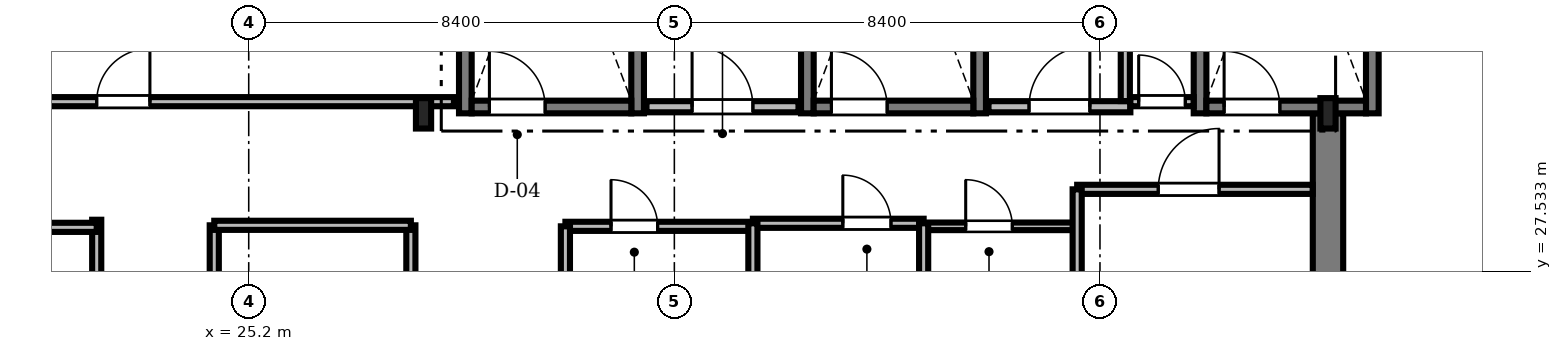
"""IFC4 building model, lengths in metres.
Left out: names, types, materials, properties, quantities, classifications, styles, units other than length and angle.
Written with IfcOpenShell. Run it as: python <this file> out.ifc"""

import sys

from ifc_helpers import new_model, si_unit, direction, frame, frame_2d, origin, origin_2d, place, context, subcontext, project, spatial, rectangle, i_section, extrude, source, transform, mapped, element, fill, save


model = new_model("IFC4")
c1 = context("Model", 3, precision=1e-05, world=origin(), true_north=direction((0.0, 1.0)))
c2 = subcontext(c1, "Body", "Model", "MODEL_VIEW")
j1 = project(units=[si_unit("LENGTHUNIT", "METRE"), si_unit("PLANEANGLEUNIT", "RADIAN")], contexts=[c1])
p1 = place(None, origin())
s1 = spatial("IfcSite", under=j1, at=p1, CompositionType="ELEMENT")
p2 = place(p1, origin())
s2 = spatial("IfcBuilding", under=s1, at=p2, CompositionType="ELEMENT")
p3 = place(p2, frame((0.0, 0.0, 254.55)))
s3 = spatial("IfcBuildingStorey", under=s2, at=p3, CompositionType="ELEMENT", Elevation=254.55)
m1 = source(origin(), c2, "Body", "SweptSolid", [
    extrude(rectangle(XDim=13.15, YDim=0.6, at=frame_2d((6.575, 0.0))), origin(), (0.0, 0.0, 1.0), 3.65),
])
p4 = place(p3, frame((46.5, 17.5, 0.0), z_axis=(0.0, 0.0, 1.0), x_axis=(0.0, 1.0, 0.0)))
e1 = element("IfcWall", 1, at=p4, inside=s3, PredefinedType="SHEAR", context=c2, shape_type="MappedRepresentation", body=[
    mapped(m1, transform((0.0, 0.0, 0.0), scale=1.0)),
])
m2 = source(origin(), c2, "Body", "SweptSolid", [
    extrude(i_section(OverallWidth=0.3, OverallDepth=0.6, WebThickness=0.015, FlangeThickness=0.03, FilletRadius=0.027, at=origin_2d()), origin(), (0.0, 0.0, 1.0), 3.65),
])
for number, where, z_axis, x_axis in (
    (2, (28.65, 30.65, 0.0), (0.0, 0.0, 1.0), (1.0, 0.0, 0.0)),
    (3, (46.5, 30.65, 0.0), (0.0, 0.0, 1.0), (1.0, 0.0, 0.0)),
):
    element("IfcColumn", number, at=place(p3, frame(where, z_axis=z_axis, x_axis=x_axis)), inside=s3, PredefinedType="COLUMN", context=c2, shape_type="MappedRepresentation", body=[
        mapped(m2, transform((0.0, 0.0, 0.0), scale=1.0)),
    ])
m3 = source(origin(), c2, "Body", "SweptSolid", [
    extrude(rectangle(XDim=9.35, YDim=0.25, at=frame_2d((4.675, 0.0))), origin(), (0.0, 0.0, 1.0), 3.75),
])
for number, where, z_axis, x_axis in (
    (4, (29.475, 30.65, 0.0), (0.0, 0.0, 1.0), (0.0, 1.0, 0.0)),
    (5, (32.875, 30.65, 0.0), (0.0, 0.0, 1.0), (0.0, 1.0, 0.0)),
):
    element("IfcWall", number, at=place(p3, frame(where, z_axis=z_axis, x_axis=x_axis)), inside=s3, PredefinedType="SOLIDWALL", context=c2, shape_type="MappedRepresentation", body=[
        mapped(m3, transform((0.0, 0.0, 0.0), scale=1.0)),
    ])
m4 = source(origin(), c2, "Body", "SweptSolid", [
    extrude(rectangle(XDim=3.15, YDim=0.25, at=frame_2d((1.575, 0.0))), origin(), (0.0, 0.0, 1.0), 3.75),
])
p5 = place(p3, frame((29.6, 30.775, 0.0), z_axis=(0.0, 0.0, 1.0), x_axis=(1.0, 0.0, 0.0)))
e6 = element("IfcWall", 6, at=p5, inside=s3, PredefinedType="SOLIDWALL", context=c2, shape_type="MappedRepresentation", body=[
    mapped(m4, transform((0.0, 0.0, 0.0), scale=1.0)),
])
m5 = source(origin(), c2, "Body", "SweptSolid", [
    extrude(rectangle(XDim=1.1, YDim=2.2, at=frame_2d((0.55, 1.1))), frame((0.0, 0.135, 0.0), z_axis=(0.0, -1.0, 0.0), x_axis=(1.0, 0.0, 0.0)), (0.0, 0.0, 1.0), 0.27),
])
p6 = place(p5, frame((0.35, 0.0, 0.0)))
e7 = element("IfcOpeningElement", 7, at=p6, cuts=e6, PredefinedType="OPENING", context=c2, shape_type="MappedRepresentation", body=[
    mapped(m5, transform((0.0, 0.0, 0.0), scale=1.0)),
])
for number, where, z_axis, x_axis in (
    (8, (36.225, 30.65, 0.0), (0.0, 0.0, 1.0), (0.0, 1.0, 0.0)),
    (9, (39.625, 30.65, 0.0), (0.0, 0.0, 1.0), (0.0, 1.0, 0.0)),
):
    element("IfcWall", number, at=place(p3, frame(where, z_axis=z_axis, x_axis=x_axis)), inside=s3, PredefinedType="SOLIDWALL", context=c2, shape_type="MappedRepresentation", body=[
        mapped(m3, transform((0.0, 0.0, 0.0), scale=1.0)),
    ])
p7 = place(p3, frame((36.35, 30.775, 0.0), z_axis=(0.0, 0.0, 1.0), x_axis=(1.0, 0.0, 0.0)))
e10 = element("IfcWall", 10, at=p7, inside=s3, PredefinedType="SOLIDWALL", context=c2, shape_type="MappedRepresentation", body=[
    mapped(m4, transform((0.0, 0.0, 0.0), scale=1.0)),
])
p8 = place(p7, frame((0.35, 0.0, 0.0)))
e11 = element("IfcOpeningElement", 11, at=p8, cuts=e10, PredefinedType="OPENING", context=c2, shape_type="MappedRepresentation", body=[
    mapped(m5, transform((0.0, 0.0, 0.0), scale=1.0)),
])
for number, where, z_axis, x_axis in (
    (12, (43.975, 30.65, 0.0), (0.0, 0.0, 1.0), (0.0, 1.0, 0.0)),
    (13, (47.375, 30.65, 0.0), (0.0, 0.0, 1.0), (0.0, 1.0, 0.0)),
):
    element("IfcWall", number, at=place(p3, frame(where, z_axis=z_axis, x_axis=x_axis)), inside=s3, PredefinedType="SOLIDWALL", context=c2, shape_type="MappedRepresentation", body=[
        mapped(m3, transform((0.0, 0.0, 0.0), scale=1.0)),
    ])
p9 = place(p3, frame((44.1, 30.775, 0.0), z_axis=(0.0, 0.0, 1.0), x_axis=(1.0, 0.0, 0.0)))
e14 = element("IfcWall", 14, at=p9, inside=s3, PredefinedType="SOLIDWALL", context=c2, shape_type="MappedRepresentation", body=[
    mapped(m4, transform((0.0, 0.0, 0.0), scale=1.0)),
])
p10 = place(p9, frame((0.35, 0.0, 0.0)))
e15 = element("IfcOpeningElement", 15, at=p10, cuts=e14, PredefinedType="OPENING", context=c2, shape_type="MappedRepresentation", body=[
    mapped(m5, transform((0.0, 0.0, 0.0), scale=1.0)),
])
m6 = source(origin(), c2, "Body", "SweptSolid", [
    extrude(rectangle(XDim=3.0, YDim=0.22, at=frame_2d((1.5, 0.0))), origin(), (0.0, 0.0, 1.0), 3.65),
])
p11 = place(p3, frame((33.05, 30.78, 0.0), z_axis=(0.0, 0.0, 1.0), x_axis=(1.0, 0.0, 0.0)))
e16 = element("IfcWall", 16, at=p11, inside=s3, PredefinedType="SOLIDWALL", context=c2, shape_type="MappedRepresentation", body=[
    mapped(m6, transform((0.0, 0.0, 0.0), scale=1.0)),
])
m7 = source(origin(), c2, "Body", "SweptSolid", [
    extrude(rectangle(XDim=1.2, YDim=2.2, at=frame_2d((0.6, 1.1))), frame((0.0, 0.12, 0.0), z_axis=(0.0, -1.0, 0.0), x_axis=(1.0, 0.0, 0.0)), (0.0, 0.0, 1.0), 0.24),
])
p12 = place(p11, frame((0.9, 0.0, 0.0)))
e17 = element("IfcOpeningElement", 17, at=p12, cuts=e16, PredefinedType="OPENING", context=c2, shape_type="MappedRepresentation", body=[
    mapped(m7, transform((0.0, 0.0, 0.0), scale=1.0)),
])
m8 = source(origin(), c2, "Body", "SweptSolid", [
    extrude(rectangle(XDim=2.8, YDim=0.22, at=frame_2d((1.4, 0.0))), origin(), (0.0, 0.0, 1.0), 3.65),
])
p13 = place(p3, frame((39.8, 30.78, 0.0), z_axis=(0.0, 0.0, 1.0), x_axis=(1.0, 0.0, 0.0)))
e18 = element("IfcWall", 18, at=p13, inside=s3, PredefinedType="SOLIDWALL", context=c2, shape_type="MappedRepresentation", body=[
    mapped(m8, transform((0.0, 0.0, 0.0), scale=1.0)),
])
p14 = place(p13, frame((0.8, 0.0, 0.0)))
e19 = element("IfcOpeningElement", 19, at=p14, cuts=e18, PredefinedType="OPENING", context=c2, shape_type="MappedRepresentation", body=[
    mapped(m7, transform((0.0, 0.0, 0.0), scale=1.0)),
])
m9 = source(origin(), c2, "Body", "SweptSolid", [
    extrude(rectangle(XDim=13.328, YDim=0.18, at=frame_2d((6.664, 0.0))), origin(), (0.0, 0.0, 1.0), 2.892),
])
p15 = place(p3, frame((15.922, 30.88, 0.0), z_axis=(0.0, 0.0, 1.0), x_axis=(1.0, 0.0, 0.0)))
e20 = element("IfcWall", 20, at=p15, inside=s3, PredefinedType="PARTITIONING", context=c2, shape_type="MappedRepresentation", body=[
    mapped(m9, transform((0.0, 0.0, 0.0), scale=1.0)),
])
m10 = source(origin(), c2, "Body", "SweptSolid", [
    extrude(rectangle(XDim=1.05, YDim=2.2, at=frame_2d((0.525, 1.1))), frame((0.0, 0.1, 0.0), z_axis=(0.0, -1.0, 0.0), x_axis=(1.0, 0.0, 0.0)), (0.0, 0.0, 1.0), 0.2),
])
p16 = place(p15, frame((6.278, 0.0, 0.0)))
e21 = element("IfcOpeningElement", 21, at=p16, cuts=e20, PredefinedType="OPENING", context=c2, shape_type="MappedRepresentation", body=[
    mapped(m10, transform((0.0, 0.0, 0.0), scale=1.0)),
])
m11 = source(origin(), c2, "Body", "SweptSolid", [
    extrude(rectangle(XDim=4.648, YDim=0.18, at=frame_2d((2.324, 0.0))), origin(), (0.0, 0.0, 1.0), 3.282),
])
p17 = place(p3, frame((41.55, 29.15, 0.0), z_axis=(0.0, 0.0, 1.0), x_axis=(1.0, 0.0, 0.0)))
e22 = element("IfcWall", 22, at=p17, inside=s3, PredefinedType="PARTITIONING", context=c2, shape_type="MappedRepresentation", body=[
    mapped(m11, transform((0.0, 0.0, 0.0), scale=1.0)),
])
m12 = source(origin(), c2, "Body", "SweptSolid", [
    extrude(rectangle(XDim=1.2, YDim=2.2, at=frame_2d((0.6, 1.1))), frame((0.0, 0.1, 0.0), z_axis=(0.0, -1.0, 0.0), x_axis=(1.0, 0.0, 0.0)), (0.0, 0.0, 1.0), 0.2),
])
p18 = place(p17, frame((1.6, 0.0, 0.0)))
e23 = element("IfcOpeningElement", 23, at=p18, cuts=e22, PredefinedType="OPENING", context=c2, shape_type="MappedRepresentation", body=[
    mapped(m12, transform((0.0, 0.0, 0.0), scale=1.0)),
])
m13 = source(origin(), c2, "Body", "SweptSolid", [
    extrude(rectangle(XDim=4.24, YDim=0.18, at=frame_2d((2.12, 0.0))), origin(), (0.0, 0.0, 1.0), 3.092),
])
p19 = place(p3, frame((24.52, 24.2, 0.0), z_axis=(0.0, 0.0, 1.0), x_axis=(0.0, 1.0, 0.0)))
e24 = element("IfcWall", 24, at=p19, inside=s3, PredefinedType="PARTITIONING", context=c2, shape_type="MappedRepresentation", body=[
    mapped(m13, transform((0.0, 0.0, 0.0), scale=1.0)),
])
p20 = place(p19, frame((1.4, 0.0, 0.0)))
e25 = element("IfcOpeningElement", 25, at=p20, cuts=e24, PredefinedType="OPENING", context=c2, shape_type="MappedRepresentation", body=[
    mapped(m10, transform((0.0, 0.0, 0.0), scale=1.0)),
])
m14 = source(origin(), c2, "Body", "SweptSolid", [
    extrude(rectangle(XDim=3.7, YDim=0.18, at=frame_2d((1.85, 0.0))), origin(), (0.0, 0.0, 1.0), 3.282),
])
p21 = place(p3, frame((31.45, 28.42, 0.0), z_axis=(0.0, 0.0, 1.0), x_axis=(1.0, 0.0, 0.0)))
e26 = element("IfcWall", 26, at=p21, inside=s3, PredefinedType="PARTITIONING", context=c2, shape_type="MappedRepresentation", body=[
    mapped(m14, transform((0.0, 0.0, 0.0), scale=1.0)),
])
m15 = source(origin(), c2, "Body", "SweptSolid", [
    extrude(rectangle(XDim=0.92, YDim=2.1, at=frame_2d((0.46, 1.05))), frame((0.0, 0.1, 0.0), z_axis=(0.0, -1.0, 0.0), x_axis=(1.0, 0.0, 0.0)), (0.0, 0.0, 1.0), 0.2),
])
p22 = place(p21, frame((0.9, 0.0, 0.0)))
e27 = element("IfcOpeningElement", 27, at=p22, cuts=e26, PredefinedType="OPENING", context=c2, shape_type="MappedRepresentation", body=[
    mapped(m15, transform((0.0, 0.0, 0.0), scale=1.0)),
])
m16 = source(origin(), c2, "Body", "SweptSolid", [
    extrude(rectangle(XDim=3.37, YDim=0.18, at=frame_2d((1.685, 0.0))), origin(), (0.0, 0.0, 1.0), 3.65),
])
p23 = place(p3, frame((35.15, 28.48, 0.0), z_axis=(0.0, 0.0, 1.0), x_axis=(1.0, 0.0, 0.0)))
e28 = element("IfcWall", 28, at=p23, inside=s3, PredefinedType="PARTITIONING", context=c2, shape_type="MappedRepresentation", body=[
    mapped(m16, transform((0.0, 0.0, 0.0), scale=1.0)),
])
m17 = source(origin(), c2, "Body", "SweptSolid", [
    extrude(rectangle(XDim=0.95, YDim=2.15, at=frame_2d((0.475, 1.075))), frame((0.0, 0.1, 0.0), z_axis=(0.0, -1.0, 0.0), x_axis=(1.0, 0.0, 0.0)), (0.0, 0.0, 1.0), 0.2),
])
p24 = place(p23, frame((1.775, 0.0, 0.0)))
e29 = element("IfcOpeningElement", 29, at=p24, cuts=e28, PredefinedType="OPENING", context=c2, shape_type="MappedRepresentation", body=[
    mapped(m17, transform((0.0, 0.0, 0.0), scale=1.0)),
])
m18 = source(origin(), c2, "Body", "SweptSolid", [
    extrude(rectangle(XDim=3.0, YDim=0.15, at=frame_2d((1.5, 0.0))), origin(), (0.0, 0.0, 1.0), 3.65),
])
p25 = place(p3, frame((38.52, 28.42, 0.0), z_axis=(0.0, 0.0, 1.0), x_axis=(1.0, 0.0, 0.0)))
e30 = element("IfcWall", 30, at=p25, inside=s3, PredefinedType="PARTITIONING", context=c2, shape_type="MappedRepresentation", body=[
    mapped(m18, transform((0.0, 0.0, 0.0), scale=1.0)),
])
m19 = source(origin(), c2, "Body", "SweptSolid", [
    extrude(rectangle(XDim=0.92, YDim=2.1, at=frame_2d((0.46, 1.05))), frame((0.0, 0.085, 0.0), z_axis=(0.0, -1.0, 0.0), x_axis=(1.0, 0.0, 0.0)), (0.0, 0.0, 1.0), 0.17),
])
p26 = place(p25, frame((0.83, 0.0, 0.0)))
e31 = element("IfcOpeningElement", 31, at=p26, cuts=e30, PredefinedType="OPENING", context=c2, shape_type="MappedRepresentation", body=[
    mapped(m19, transform((0.0, 0.0, 0.0), scale=1.0)),
])
m20 = source(origin(), c2, "Body", "SweptSolid", [
    extrude(rectangle(XDim=1.248, YDim=0.18, at=frame_2d((0.624, 0.0))), origin(), (0.0, 0.0, 1.0), 3.65),
])
p27 = place(p3, frame((42.6, 30.88, 0.0), z_axis=(0.0, 0.0, 1.0), x_axis=(1.0, 0.0, 0.0)))
e32 = element("IfcWall", 32, at=p27, inside=s3, PredefinedType="PARTITIONING", context=c2, shape_type="MappedRepresentation", body=[
    mapped(m20, transform((0.0, 0.0, 0.0), scale=1.0)),
])
p28 = place(p27, frame((0.164, 0.0, 0.0)))
e33 = element("IfcOpeningElement", 33, at=p28, cuts=e32, PredefinedType="OPENING", context=c2, shape_type="MappedRepresentation", body=[
    mapped(m15, transform((0.0, 0.0, 0.0), scale=1.0)),
])
m21 = source(origin(), c2, "Body", "SweptSolid", [
    extrude(rectangle(XDim=15.04, YDim=0.18, at=frame_2d((7.52, 0.0))), origin(), (0.0, 0.0, 1.0), 3.092),
])
p29 = place(p3, frame((22.2, 13.51, 0.0), z_axis=(0.0, 0.0, 1.0), x_axis=(0.0, 1.0, 0.0)))
e34 = element("IfcWall", 34, at=p29, inside=s3, PredefinedType="PARTITIONING", context=c2, shape_type="MappedRepresentation", body=[
    mapped(m21, transform((0.0, 0.0, 0.0), scale=1.0)),
])
m22 = source(origin(), c2, "Body", "SweptSolid", [
    extrude(rectangle(XDim=6.47, YDim=0.18, at=frame_2d((3.235, 0.0))), origin(), (0.0, 0.0, 1.0), 2.892),
])
p30 = place(p3, frame((15.73, 28.4, 0.0), z_axis=(0.0, 0.0, 1.0), x_axis=(1.0, 0.0, 0.0)))
e35 = element("IfcWall", 35, at=p30, inside=s3, PredefinedType="PARTITIONING", context=c2, shape_type="MappedRepresentation", body=[
    mapped(m22, transform((0.0, 0.0, 0.0), scale=1.0)),
])
p31 = place(p3, frame((28.4, 24.2, 0.0), z_axis=(0.0, 0.0, 1.0), x_axis=(0.0, 1.0, 0.0)))
e36 = element("IfcWall", 36, at=p31, inside=s3, PredefinedType="PARTITIONING", context=c2, shape_type="MappedRepresentation", body=[
    mapped(m13, transform((0.0, 0.0, 0.0), scale=1.0)),
])
m23 = source(origin(), c2, "Body", "SweptSolid", [
    extrude(rectangle(XDim=3.88, YDim=0.18, at=frame_2d((1.94, 0.0))), origin(), (0.0, 0.0, 1.0), 3.65),
])
p32 = place(p3, frame((24.52, 28.44, 0.0), z_axis=(0.0, 0.0, 1.0), x_axis=(1.0, 0.0, 0.0)))
e37 = element("IfcWall", 37, at=p32, inside=s3, PredefinedType="PARTITIONING", context=c2, shape_type="MappedRepresentation", body=[
    mapped(m23, transform((0.0, 0.0, 0.0), scale=1.0)),
])
m24 = source(origin(), c2, "Body", "SweptSolid", [
    extrude(rectangle(XDim=2.35, YDim=0.18, at=frame_2d((1.175, 0.0))), origin(), (0.0, 0.0, 1.0), 3.282),
])
p33 = place(p3, frame((41.55, 26.8, 0.0), z_axis=(0.0, 0.0, 1.0), x_axis=(0.0, 1.0, 0.0)))
e38 = element("IfcWall", 38, at=p33, inside=s3, PredefinedType="PARTITIONING", context=c2, shape_type="MappedRepresentation", body=[
    mapped(m24, transform((0.0, 0.0, 0.0), scale=1.0)),
])
m25 = source(origin(), c2, "Body", "SweptSolid", [
    extrude(rectangle(XDim=1.858, YDim=0.18, at=frame_2d((0.929, 0.0))), origin(), (0.0, 0.0, 1.0), 3.65),
])
p34 = place(p3, frame((42.5, 30.892, 0.0), z_axis=(0.0, 0.0, 1.0), x_axis=(0.0, 1.0, 0.0)))
e39 = element("IfcWall", 39, at=p34, inside=s3, PredefinedType="PARTITIONING", context=c2, shape_type="MappedRepresentation", body=[
    mapped(m25, transform((0.0, 0.0, 0.0), scale=1.0)),
])
m26 = source(origin(), c2, "Body", "SweptSolid", [
    extrude(rectangle(XDim=1.66, YDim=0.18, at=frame_2d((0.83, 0.0))), origin(), (0.0, 0.0, 1.0), 3.192),
])
for number, where, z_axis, x_axis in (
    (40, (35.15, 26.82, 0.0), (0.0, 0.0, 1.0), (0.0, 1.0, 0.0)),
    (41, (38.52, 26.82, 0.0), (0.0, 0.0, 1.0), (0.0, 1.0, 0.0)),
):
    element("IfcWall", number, at=place(p3, frame(where, z_axis=z_axis, x_axis=x_axis)), inside=s3, PredefinedType="PARTITIONING", context=c2, shape_type="MappedRepresentation", body=[
        mapped(m26, transform((0.0, 0.0, 0.0), scale=1.0)),
    ])
m27 = source(origin(), c2, "Body", "SweptSolid", [
    extrude(rectangle(XDim=1.6, YDim=0.18, at=frame_2d((0.8, 0.0))), origin(), (0.0, 0.0, 1.0), 3.192),
])
p35 = place(p3, frame((31.45, 26.82, 0.0), z_axis=(0.0, 0.0, 1.0), x_axis=(0.0, 1.0, 0.0)))
e42 = element("IfcWall", 42, at=p35, inside=s3, PredefinedType="PARTITIONING", context=c2, shape_type="MappedRepresentation", body=[
    mapped(m27, transform((0.0, 0.0, 0.0), scale=1.0)),
])
m28 = source(origin(), c2, "Body", "SweptSolid", [
    extrude(rectangle(XDim=1.1, YDim=2.2, at=frame_2d((0.55, 1.1))), frame((0.0, 0.025, 0.0), z_axis=(0.0, -1.0, 0.0), x_axis=(1.0, 0.0, 0.0)), (0.0, 0.0, 1.0), 0.05),
])
p36 = place(p6, origin())
e43 = element("IfcDoor", 43, at=p36, inside=s3, OperationType="SINGLE_SWING_LEFT", PredefinedType="DOOR", context=c2, shape_type="MappedRepresentation", body=[
    mapped(m28, transform((0.0, 0.0, 0.0), scale=1.0)),
])
fill(e7, e43)
p37 = place(p8, origin())
e44 = element("IfcDoor", 44, at=p37, inside=s3, OperationType="SINGLE_SWING_LEFT", PredefinedType="DOOR", context=c2, shape_type="MappedRepresentation", body=[
    mapped(m28, transform((0.0, 0.0, 0.0), scale=1.0)),
])
fill(e11, e44)
p38 = place(p10, origin())
e45 = element("IfcDoor", 45, at=p38, inside=s3, OperationType="SINGLE_SWING_LEFT", PredefinedType="DOOR", context=c2, shape_type="MappedRepresentation", body=[
    mapped(m28, transform((0.0, 0.0, 0.0), scale=1.0)),
])
fill(e15, e45)
m29 = source(origin(), c2, "Body", "SweptSolid", [
    extrude(rectangle(XDim=1.2, YDim=2.2, at=frame_2d((0.6, 1.1))), frame((0.0, 0.025, 0.0), z_axis=(0.0, -1.0, 0.0), x_axis=(1.0, 0.0, 0.0)), (0.0, 0.0, 1.0), 0.05),
])
p39 = place(p12, origin())
e46 = element("IfcDoor", 46, at=p39, inside=s3, OperationType="SINGLE_SWING_LEFT", PredefinedType="DOOR", context=c2, shape_type="MappedRepresentation", body=[
    mapped(m29, transform((0.0, 0.0, 0.0), scale=1.0)),
])
fill(e17, e46)
p40 = place(p14, origin())
e47 = element("IfcDoor", 47, at=p40, inside=s3, OperationType="SINGLE_SWING_RIGHT", PredefinedType="DOOR", context=c2, shape_type="MappedRepresentation", body=[
    mapped(m29, transform((0.0, 0.0, 0.0), scale=1.0)),
])
fill(e19, e47)
m30 = source(origin(), c2, "Body", "SweptSolid", [
    extrude(rectangle(XDim=1.05, YDim=2.2, at=frame_2d((0.525, 1.1))), frame((0.0, 0.025, 0.0), z_axis=(0.0, -1.0, 0.0), x_axis=(1.0, 0.0, 0.0)), (0.0, 0.0, 1.0), 0.05),
])
p41 = place(p16, origin())
e48 = element("IfcDoor", 48, at=p41, inside=s3, OperationType="SINGLE_SWING_RIGHT", PredefinedType="DOOR", context=c2, shape_type="MappedRepresentation", body=[
    mapped(m30, transform((0.0, 0.0, 0.0), scale=1.0)),
])
fill(e21, e48)
p42 = place(p18, origin())
e49 = element("IfcDoor", 49, at=p42, inside=s3, OperationType="SINGLE_SWING_RIGHT", PredefinedType="DOOR", context=c2, shape_type="MappedRepresentation", body=[
    mapped(m29, transform((0.0, 0.0, 0.0), scale=1.0)),
])
fill(e23, e49)
m31 = source(origin(), c2, "Body", "SweptSolid", [
    extrude(rectangle(XDim=0.92, YDim=2.1, at=frame_2d((0.46, 1.05))), frame((0.0, 0.025, 0.0), z_axis=(0.0, -1.0, 0.0), x_axis=(1.0, 0.0, 0.0)), (0.0, 0.0, 1.0), 0.05),
])
p43 = place(p22, origin())
e50 = element("IfcDoor", 50, at=p43, inside=s3, OperationType="SINGLE_SWING_LEFT", PredefinedType="DOOR", context=c2, shape_type="MappedRepresentation", body=[
    mapped(m31, transform((0.0, 0.0, 0.0), scale=1.0)),
])
fill(e27, e50)
m32 = source(origin(), c2, "Body", "SweptSolid", [
    extrude(rectangle(XDim=0.95, YDim=2.15, at=frame_2d((0.475, 1.075))), frame((0.0, 0.025, 0.0), z_axis=(0.0, -1.0, 0.0), x_axis=(1.0, 0.0, 0.0)), (0.0, 0.0, 1.0), 0.05),
])
p44 = place(p24, origin())
e51 = element("IfcDoor", 51, at=p44, inside=s3, OperationType="SINGLE_SWING_LEFT", PredefinedType="DOOR", context=c2, shape_type="MappedRepresentation", body=[
    mapped(m32, transform((0.0, 0.0, 0.0), scale=1.0)),
])
fill(e29, e51)
p45 = place(p26, origin())
e52 = element("IfcDoor", 52, at=p45, inside=s3, OperationType="SINGLE_SWING_LEFT", PredefinedType="DOOR", context=c2, shape_type="MappedRepresentation", body=[
    mapped(m31, transform((0.0, 0.0, 0.0), scale=1.0)),
])
fill(e31, e52)
p46 = place(p28, origin())
e53 = element("IfcDoor", 53, at=p46, inside=s3, OperationType="SINGLE_SWING_LEFT", PredefinedType="DOOR", context=c2, shape_type="MappedRepresentation", body=[
    mapped(m31, transform((0.0, 0.0, 0.0), scale=1.0)),
])
fill(e33, e53)
save(model, sys.argv[1])
